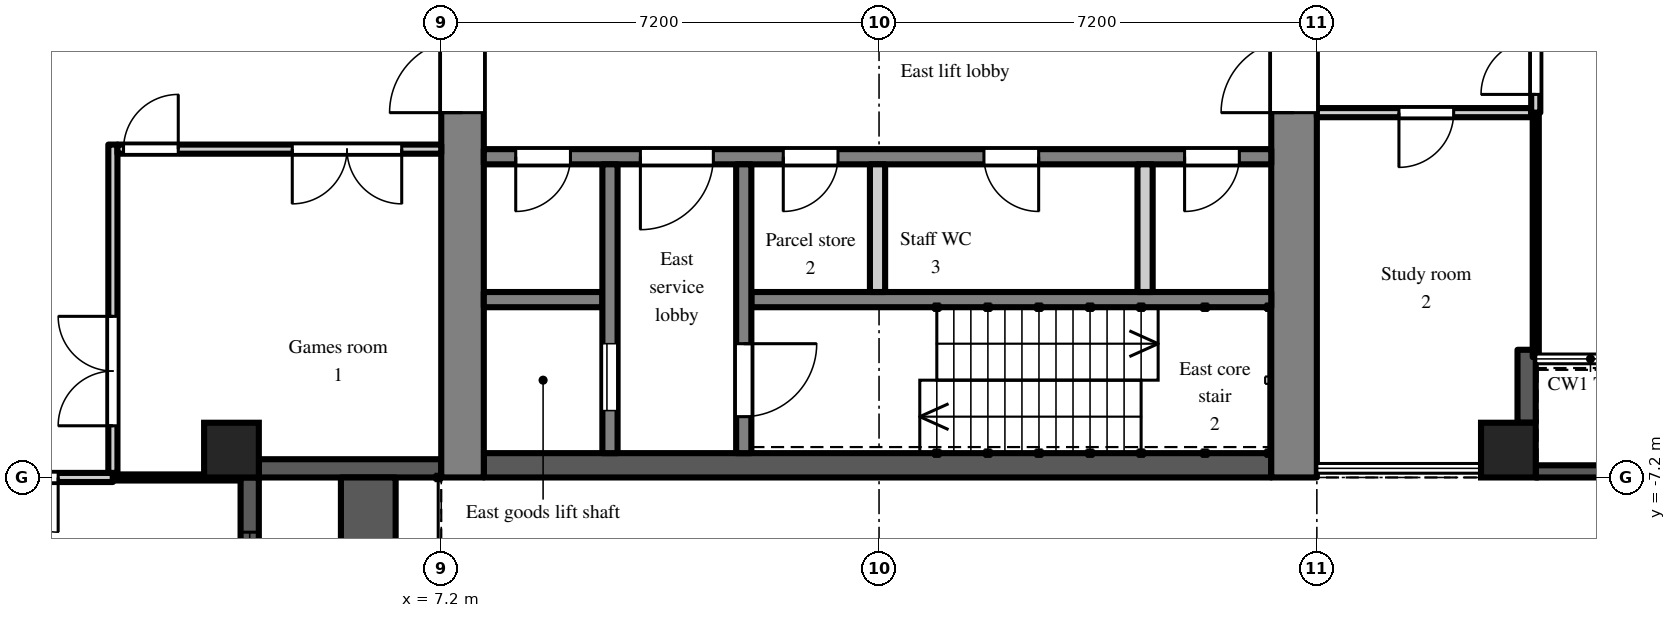
"""IFC4 building model, lengths in metres.
Left out: names, types, materials, properties, quantities, classifications, styles, units other than length and angle.
Written with IfcOpenShell. Run it as: python <this file> out.ifc"""

import sys

from ifc_helpers import new_model, si_unit, direction, frame, frame_2d, origin, origin_2d, place, context, subcontext, project, spatial, rectangle, extrude, element, fill, save


model = new_model("IFC4")
c1 = context("Model", 3, precision=1e-05, world=origin(), true_north=direction((0.0, 1.0)))
c2 = subcontext(c1, "Body", "Model", "MODEL_VIEW")
j1 = project(units=[si_unit("LENGTHUNIT", "METRE"), si_unit("PLANEANGLEUNIT", "RADIAN")], contexts=[c1])
p1 = place(None, origin())
s1 = spatial("IfcSite", under=j1, at=p1, CompositionType="ELEMENT")
p2 = place(p1, origin())
s2 = spatial("IfcBuilding", under=s1, at=p2, CompositionType="ELEMENT")
p3 = place(p2, frame((0.0, 0.0, 166.5)))
s3 = spatial("IfcBuildingStorey", under=s2, at=p3, CompositionType="ELEMENT", Elevation=166.5)
for number, where, z_axis, x_axis in (
    (1, (3.75, -6.75, 0.0), (0.0, 0.0, 1.0), (1.0, 0.0, 0.0)),
    (2, (24.75, -6.75, 0.0), (0.0, 0.0, 1.0), (1.0, 0.0, 0.0)),
):
    element("IfcColumn", number, at=place(p3, frame(where, z_axis=z_axis, x_axis=x_axis)), inside=s3, PredefinedType="COLUMN", context=c2, shape_type="SweptSolid", body=[
        extrude(rectangle(XDim=0.9, YDim=0.9, at=origin_2d()), origin(), (0.0, 0.0, 1.0), 4.2),
    ])
p4 = place(p3, frame((25.05, -6.3, 0.0), z_axis=(0.0, 0.0, 1.0), x_axis=(0.0, 1.0, 0.0)))
e3 = element("IfcWall", 3, at=p4, inside=s3, PredefinedType="SOLIDWALL", context=c2, shape_type="SweptSolid", body=[
    extrude(rectangle(XDim=1.2, YDim=0.3, at=frame_2d((0.6, 0.0))), origin(), (0.0, 0.0, 1.0), 3.8),
])
p5 = place(p3, frame((4.05, -14.4, 0.0), z_axis=(0.0, 0.0, 1.0), x_axis=(0.0, 1.0, 0.0)))
e4 = element("IfcWall", 4, at=p5, inside=s3, PredefinedType="SOLIDWALL", context=c2, shape_type="SweptSolid", body=[
    extrude(rectangle(XDim=7.2, YDim=0.3, at=frame_2d((3.6, 0.0))), origin(), (0.0, 0.0, 1.0), 3.4),
])
p6 = place(p5, frame((3.0, 0.0, 0.0)))
e5 = element("IfcOpeningElement", 5, at=p6, cuts=e4, PredefinedType="OPENING", context=c2, shape_type="SweptSolid", body=[
    extrude(rectangle(XDim=1.2, YDim=2.05, at=frame_2d((0.6, 1.025))), frame((0.0, 0.16, 0.0), z_axis=(0.0, -1.0, 0.0), x_axis=(1.0, 0.0, 0.0)), (0.0, 0.0, 1.0), 0.32),
])
p7 = place(p5, frame((0.9, 0.0, 0.2)))
e6 = element("IfcOpeningElement", 6, at=p7, cuts=e4, PredefinedType="OPENING", context=c2, shape_type="SweptSolid", body=[
    extrude(rectangle(XDim=1.8, YDim=1.85, at=frame_2d((0.9, 0.925))), frame((0.0, 0.16, 0.0), z_axis=(0.0, -1.0, 0.0), x_axis=(1.0, 0.0, 0.0)), (0.0, 0.0, 1.0), 0.32),
])
p8 = place(p5, frame((4.5, 0.0, 0.2)))
e7 = element("IfcOpeningElement", 7, at=p8, cuts=e4, PredefinedType="OPENING", context=c2, shape_type="SweptSolid", body=[
    extrude(rectangle(XDim=1.8, YDim=1.85, at=frame_2d((0.9, 0.925))), frame((0.0, 0.16, 0.0), z_axis=(0.0, -1.0, 0.0), x_axis=(1.0, 0.0, 0.0)), (0.0, 0.0, 1.0), 0.32),
])
p9 = place(p3, frame((4.2, -7.05, 0.0), z_axis=(0.0, 0.0, 1.0), x_axis=(1.0, 0.0, 0.0)))
e8 = element("IfcWall", 8, at=p9, inside=s3, PredefinedType="SOLIDWALL", context=c2, shape_type="SweptSolid", body=[
    extrude(rectangle(XDim=3.0, YDim=0.3, at=frame_2d((1.5, 0.0))), origin(), (0.0, 0.0, 1.0), 3.4),
])
p10 = place(p3, frame((6.0, -14.4, 0.0), z_axis=(0.0, 0.0, 1.0), x_axis=(0.0, 1.0, 0.0)))
e9 = element("IfcWall", 9, at=p10, inside=s3, PredefinedType="PARAPET", context=c2, shape_type="SweptSolid", body=[
    extrude(rectangle(XDim=7.2, YDim=0.9, at=frame_2d((3.6, 0.0))), origin(), (0.0, 0.0, 1.0), 0.8),
])
p11 = place(p3, frame((25.2, -7.1, 0.0), z_axis=(0.0, 0.0, 1.0), x_axis=(1.0, 0.0, 0.0)))
e10 = element("IfcWall", 10, at=p11, inside=s3, PredefinedType="PARAPET", context=c2, shape_type="SweptSolid", body=[
    extrude(rectangle(XDim=14.2, YDim=0.2, at=frame_2d((7.1, 0.0))), origin(), (0.0, 0.0, 1.0), 1.1),
])
p12 = place(p3, frame((7.55, -7.2, 0.0), z_axis=(0.0, 0.0, 1.0), x_axis=(0.0, 1.0, 0.0)))
e11 = element("IfcWall", 11, at=p12, inside=s3, PredefinedType="SHEAR", context=c2, shape_type="SweptSolid", body=[
    extrude(rectangle(XDim=14.4, YDim=0.7, at=frame_2d((7.2, 0.0))), origin(), (0.0, 0.0, 1.0), 3.8),
])
p13 = place(p12, frame((6.0, 0.0, 0.0)))
e12 = element("IfcOpeningElement", 12, at=p13, cuts=e11, PredefinedType="OPENING", context=c2, shape_type="SweptSolid", body=[
    extrude(rectangle(XDim=2.4, YDim=2.2, at=frame_2d((1.2, 1.1))), frame((0.0, 0.36, 0.0), z_axis=(0.0, -1.0, 0.0), x_axis=(1.0, 0.0, 0.0)), (0.0, 0.0, 1.0), 0.72),
])
p14 = place(p3, frame((21.225, -7.2, 0.0), z_axis=(0.0, 0.0, 1.0), x_axis=(0.0, 1.0, 0.0)))
e13 = element("IfcWall", 13, at=p14, inside=s3, PredefinedType="SHEAR", context=c2, shape_type="SweptSolid", body=[
    extrude(rectangle(XDim=14.4, YDim=0.75, at=frame_2d((7.2, 0.0))), origin(), (0.0, 0.0, 1.0), 3.8),
])
p15 = place(p14, frame((6.0, 0.0, 0.0)))
e14 = element("IfcOpeningElement", 14, at=p15, cuts=e13, PredefinedType="OPENING", context=c2, shape_type="SweptSolid", body=[
    extrude(rectangle(XDim=2.4, YDim=2.2, at=frame_2d((1.2, 1.1))), frame((0.0, 0.385, 0.0), z_axis=(0.0, -1.0, 0.0), x_axis=(1.0, 0.0, 0.0)), (0.0, 0.0, 1.0), 0.77),
])
p16 = place(p3, frame((7.9, -7.0, 0.0), z_axis=(0.0, 0.0, 1.0), x_axis=(1.0, 0.0, 0.0)))
e15 = element("IfcWall", 15, at=p16, inside=s3, PredefinedType="SHEAR", context=c2, shape_type="SweptSolid", body=[
    extrude(rectangle(XDim=12.95, YDim=0.4, at=frame_2d((6.475, 0.0))), origin(), (0.0, 0.0, 1.0), 3.8),
])
p17 = place(p3, frame((7.9, -1.925, 0.0), z_axis=(0.0, 0.0, 1.0), x_axis=(1.0, 0.0, 0.0)))
e16 = element("IfcWall", 16, at=p17, inside=s3, PredefinedType="SHEAR", context=c2, shape_type="SweptSolid", body=[
    extrude(rectangle(XDim=12.95, YDim=0.25, at=frame_2d((6.475, 0.0))), origin(), (0.0, 0.0, 1.0), 3.8),
])
p18 = place(p17, frame((0.525, 0.0, 0.0)))
e17 = element("IfcOpeningElement", 17, at=p18, cuts=e16, PredefinedType="OPENING", context=c2, shape_type="SweptSolid", body=[
    extrude(rectangle(XDim=0.9, YDim=2.1, at=frame_2d((0.45, 1.05))), frame((0.0, 0.135, 0.0), z_axis=(0.0, -1.0, 0.0), x_axis=(1.0, 0.0, 0.0)), (0.0, 0.0, 1.0), 0.27),
])
p19 = place(p17, frame((2.575, 0.0, 0.0)))
e18 = element("IfcOpeningElement", 18, at=p19, cuts=e16, PredefinedType="OPENING", context=c2, shape_type="SweptSolid", body=[
    extrude(rectangle(XDim=1.2, YDim=2.1, at=frame_2d((0.6, 1.05))), frame((0.0, 0.135, 0.0), z_axis=(0.0, -1.0, 0.0), x_axis=(1.0, 0.0, 0.0)), (0.0, 0.0, 1.0), 0.27),
])
p20 = place(p17, frame((4.925, 0.0, 0.0)))
e19 = element("IfcOpeningElement", 19, at=p20, cuts=e16, PredefinedType="OPENING", context=c2, shape_type="SweptSolid", body=[
    extrude(rectangle(XDim=0.9, YDim=2.1, at=frame_2d((0.45, 1.05))), frame((0.0, 0.135, 0.0), z_axis=(0.0, -1.0, 0.0), x_axis=(1.0, 0.0, 0.0)), (0.0, 0.0, 1.0), 0.27),
])
p21 = place(p17, frame((8.225, 0.0, 0.0)))
e20 = element("IfcOpeningElement", 20, at=p21, cuts=e16, PredefinedType="OPENING", context=c2, shape_type="SweptSolid", body=[
    extrude(rectangle(XDim=0.9, YDim=2.1, at=frame_2d((0.45, 1.05))), frame((0.0, 0.135, 0.0), z_axis=(0.0, -1.0, 0.0), x_axis=(1.0, 0.0, 0.0)), (0.0, 0.0, 1.0), 0.27),
])
p22 = place(p17, frame((11.525, 0.0, 0.0)))
e21 = element("IfcOpeningElement", 21, at=p22, cuts=e16, PredefinedType="OPENING", context=c2, shape_type="SweptSolid", body=[
    extrude(rectangle(XDim=0.9, YDim=2.1, at=frame_2d((0.45, 1.05))), frame((0.0, 0.135, 0.0), z_axis=(0.0, -1.0, 0.0), x_axis=(1.0, 0.0, 0.0)), (0.0, 0.0, 1.0), 0.27),
])
p23 = place(p3, frame((7.9, -4.275, 0.0), z_axis=(0.0, 0.0, 1.0), x_axis=(1.0, 0.0, 0.0)))
e22 = element("IfcWall", 22, at=p23, inside=s3, PredefinedType="SHEAR", context=c2, shape_type="SweptSolid", body=[
    extrude(rectangle(XDim=1.95, YDim=0.25, at=frame_2d((0.975, 0.0))), origin(), (0.0, 0.0, 1.0), 3.8),
])
p24 = place(p3, frame((12.3, -4.275, 0.0), z_axis=(0.0, 0.0, 1.0), x_axis=(1.0, 0.0, 0.0)))
e23 = element("IfcWall", 23, at=p24, inside=s3, PredefinedType="SHEAR", context=c2, shape_type="SweptSolid", body=[
    extrude(rectangle(XDim=8.55, YDim=0.25, at=frame_2d((4.275, 0.0))), origin(), (0.0, 0.0, 1.0), 3.8),
])
p25 = place(p3, frame((9.975, -2.05, 0.0), z_axis=(0.0, 0.0, 1.0), x_axis=(0.0, -1.0, 0.0)))
e24 = element("IfcWall", 24, at=p25, inside=s3, PredefinedType="SHEAR", context=c2, shape_type="SweptSolid", body=[
    extrude(rectangle(XDim=4.75, YDim=0.25, at=frame_2d((2.375, 0.0))), origin(), (0.0, 0.0, 1.0), 3.8),
])
p26 = place(p25, frame((2.95, 0.0, 0.0)))
e25 = element("IfcOpeningElement", 25, at=p26, cuts=e24, PredefinedType="OPENING", context=c2, shape_type="SweptSolid", body=[
    extrude(rectangle(XDim=1.1, YDim=2.1, at=frame_2d((0.55, 1.05))), frame((0.0, 0.135, 0.0), z_axis=(0.0, -1.0, 0.0), x_axis=(1.0, 0.0, 0.0)), (0.0, 0.0, 1.0), 0.27),
])
p27 = place(p3, frame((12.175, -2.05, 0.0), z_axis=(0.0, 0.0, 1.0), x_axis=(0.0, -1.0, 0.0)))
e26 = element("IfcWall", 26, at=p27, inside=s3, PredefinedType="SHEAR", context=c2, shape_type="SweptSolid", body=[
    extrude(rectangle(XDim=4.75, YDim=0.25, at=frame_2d((2.375, 0.0))), origin(), (0.0, 0.0, 1.0), 3.8),
])
p28 = place(p27, frame((2.95, 0.0, 0.0)))
e27 = element("IfcOpeningElement", 27, at=p28, cuts=e26, PredefinedType="OPENING", context=c2, shape_type="SweptSolid", body=[
    extrude(rectangle(XDim=1.2, YDim=2.1, at=frame_2d((0.6, 1.05))), frame((0.0, 0.135, 0.0), z_axis=(0.0, -1.0, 0.0), x_axis=(1.0, 0.0, 0.0)), (0.0, 0.0, 1.0), 0.27),
])
for number, where, z_axis, x_axis in (
    (28, (14.375, -2.05, 0.0), (0.0, 0.0, 1.0), (0.0, -1.0, 0.0)),
    (29, (18.775, -2.05, 0.0), (0.0, 0.0, 1.0), (0.0, -1.0, 0.0)),
):
    element("IfcWall", number, at=place(p3, frame(where, z_axis=z_axis, x_axis=x_axis)), inside=s3, PredefinedType="PARTITIONING", context=c2, shape_type="SweptSolid", body=[
        extrude(rectangle(XDim=2.1, YDim=0.25, at=frame_2d((1.05, 0.0))), origin(), (0.0, 0.0, 1.0), 3.8),
    ])
p29 = place(p3, frame((-3.765, -7.2, 0.0), z_axis=(0.0, 0.0, 1.0), x_axis=(1.0, 0.0, 0.0)))
e30 = element("IfcWall", 30, at=p29, inside=s3, PredefinedType="PARTITIONING", context=c2, shape_type="SweptSolid", body=[
    extrude(rectangle(XDim=5.565, YDim=0.15, at=frame_2d((2.782, 0.0))), origin(), (0.0, 0.0, 1.0), 3.8),
])
p30 = place(p29, frame((2.865, 0.0, 0.0)))
e31 = element("IfcOpeningElement", 31, at=p30, cuts=e30, PredefinedType="OPENING", context=c2, shape_type="SweptSolid", body=[
    extrude(rectangle(XDim=1.8, YDim=2.1, at=frame_2d((0.9, 1.05))), frame((0.0, 0.085, 0.0), z_axis=(0.0, -1.0, 0.0), x_axis=(1.0, 0.0, 0.0)), (0.0, 0.0, 1.0), 0.17),
])
p31 = place(p3, frame((1.8, -7.125, 0.0), z_axis=(0.0, 0.0, 1.0), x_axis=(0.0, 1.0, 0.0)))
e32 = element("IfcWall", 32, at=p31, inside=s3, PredefinedType="PARTITIONING", context=c2, shape_type="SweptSolid", body=[
    extrude(rectangle(XDim=5.4, YDim=0.15, at=frame_2d((2.7, 0.0))), origin(), (0.0, 0.0, 1.0), 3.8),
])
p32 = place(p31, frame((0.775, 0.0, 0.0)))
e33 = element("IfcOpeningElement", 33, at=p32, cuts=e32, PredefinedType="OPENING", context=c2, shape_type="SweptSolid", body=[
    extrude(rectangle(XDim=1.8, YDim=2.1, at=frame_2d((0.9, 1.05))), frame((0.0, 0.085, 0.0), z_axis=(0.0, -1.0, 0.0), x_axis=(1.0, 0.0, 0.0)), (0.0, 0.0, 1.0), 0.17),
])
p33 = place(p3, frame((1.8, -7.2, 0.0), z_axis=(0.0, 0.0, 1.0), x_axis=(1.0, 0.0, 0.0)))
e34 = element("IfcWall", 34, at=p33, inside=s3, PredefinedType="PARTITIONING", context=c2, shape_type="SweptSolid", body=[
    extrude(rectangle(XDim=2.1, YDim=0.1, at=frame_2d((1.05, 0.0))), origin(), (0.0, 0.0, 1.0), 3.8),
])
p34 = place(p3, frame((1.875, -1.8, 0.0), z_axis=(0.0, 0.0, 1.0), x_axis=(1.0, 0.0, 0.0)))
e35 = element("IfcWall", 35, at=p34, inside=s3, PredefinedType="PARTITIONING", context=c2, shape_type="SweptSolid", body=[
    extrude(rectangle(XDim=5.325, YDim=0.15, at=frame_2d((2.663, 0.0))), origin(), (0.0, 0.0, 1.0), 3.8),
])
p35 = place(p34, frame((0.1, 0.0, 0.0)))
e36 = element("IfcOpeningElement", 36, at=p35, cuts=e35, PredefinedType="OPENING", context=c2, shape_type="SweptSolid", body=[
    extrude(rectangle(XDim=0.9, YDim=2.1, at=frame_2d((0.45, 1.05))), frame((0.0, 0.085, 0.0), z_axis=(0.0, -1.0, 0.0), x_axis=(1.0, 0.0, 0.0)), (0.0, 0.0, 1.0), 0.17),
])
p36 = place(p34, frame((2.875, 0.0, 0.0)))
e37 = element("IfcOpeningElement", 37, at=p36, cuts=e35, PredefinedType="OPENING", context=c2, shape_type="SweptSolid", body=[
    extrude(rectangle(XDim=1.8, YDim=2.1, at=frame_2d((0.9, 1.05))), frame((0.0, 0.085, 0.0), z_axis=(0.0, -1.0, 0.0), x_axis=(1.0, 0.0, 0.0)), (0.0, 0.0, 1.0), 0.17),
])
p37 = place(p3, frame((21.6, -1.2, 0.0), z_axis=(0.0, 0.0, 1.0), x_axis=(1.0, 0.0, 0.0)))
e38 = element("IfcWall", 38, at=p37, inside=s3, PredefinedType="PARTITIONING", context=c2, shape_type="SweptSolid", body=[
    extrude(rectangle(XDim=3.525, YDim=0.15, at=frame_2d((1.762, 0.0))), origin(), (0.0, 0.0, 1.0), 3.8),
])
p38 = place(p37, frame((1.35, 0.0, 0.0)))
e39 = element("IfcOpeningElement", 39, at=p38, cuts=e38, PredefinedType="OPENING", context=c2, shape_type="SweptSolid", body=[
    extrude(rectangle(XDim=0.9, YDim=2.1, at=frame_2d((0.45, 1.05))), frame((0.0, 0.085, 0.0), z_axis=(0.0, -1.0, 0.0), x_axis=(1.0, 0.0, 0.0)), (0.0, 0.0, 1.0), 0.17),
])
p39 = place(p3, frame((25.2, -5.22, 0.0), z_axis=(0.0, 0.0, 1.0), x_axis=(0.0, 1.0, 0.0)))
e40 = element("IfcWall", 40, at=p39, inside=s3, PredefinedType="PARTITIONING", context=c2, shape_type="SweptSolid", body=[
    extrude(rectangle(XDim=4.02, YDim=0.1, at=frame_2d((2.01, 0.0))), origin(), (0.0, 0.0, 1.0), 3.8),
])
p40 = place(p3, frame((25.2, -1.2, 0.0), z_axis=(0.0, 0.0, 1.0), x_axis=(0.0, 1.0, 0.0)))
e41 = element("IfcWall", 41, at=p40, inside=s3, PredefinedType="PARTITIONING", context=c2, shape_type="SweptSolid", body=[
    extrude(rectangle(XDim=2.4, YDim=0.15, at=frame_2d((1.2, 0.0))), origin(), (0.0, 0.0, 1.0), 3.8),
])
p41 = place(p40, frame((0.3, 0.0, 0.0)))
e42 = element("IfcOpeningElement", 42, at=p41, cuts=e41, PredefinedType="OPENING", context=c2, shape_type="SweptSolid", body=[
    extrude(rectangle(XDim=1.8, YDim=2.1, at=frame_2d((0.9, 1.05))), frame((0.0, 0.085, 0.0), z_axis=(0.0, -1.0, 0.0), x_axis=(1.0, 0.0, 0.0)), (0.0, 0.0, 1.0), 0.17),
])
p42 = place(p8, origin())
e43 = element("IfcWindow", 43, at=p42, inside=s3, PartitioningType="SINGLE_PANEL", PredefinedType="WINDOW", context=c2, shape_type="SweptSolid", body=[
    extrude(rectangle(XDim=1.8, YDim=1.85, at=frame_2d((0.9, 0.925))), frame((0.0, 0.03, 0.0), z_axis=(0.0, -1.0, 0.0), x_axis=(1.0, 0.0, 0.0)), (0.0, 0.0, 1.0), 0.06),
])
fill(e7, e43)
p43 = place(p26, origin())
e44 = element("IfcDoor", 44, at=p43, inside=s3, OperationType="SLIDING_TO_LEFT", PredefinedType="DOOR", context=c2, shape_type="SweptSolid", body=[
    extrude(rectangle(XDim=1.1, YDim=2.1, at=frame_2d((0.55, 1.05))), frame((0.0, 0.025, 0.0), z_axis=(0.0, -1.0, 0.0), x_axis=(1.0, 0.0, 0.0)), (0.0, 0.0, 1.0), 0.05),
])
fill(e25, e44)
p44 = place(p28, origin())
e45 = element("IfcDoor", 45, at=p44, inside=s3, OperationType="SINGLE_SWING_LEFT", PredefinedType="DOOR", context=c2, shape_type="SweptSolid", body=[
    extrude(rectangle(XDim=1.2, YDim=2.1, at=frame_2d((0.6, 1.05))), frame((0.0, 0.025, 0.0), z_axis=(0.0, -1.0, 0.0), x_axis=(1.0, 0.0, 0.0)), (0.0, 0.0, 1.0), 0.05),
])
fill(e27, e45)
p45 = place(p18, frame((0.9, 0.0, 0.0), z_axis=(0.0, 0.0, 1.0), x_axis=(-1.0, 0.0, 0.0)))
e46 = element("IfcDoor", 46, at=p45, inside=s3, OperationType="SINGLE_SWING_RIGHT", PredefinedType="DOOR", context=c2, shape_type="SweptSolid", body=[
    extrude(rectangle(XDim=0.9, YDim=2.1, at=frame_2d((0.45, 1.05))), frame((0.0, 0.025, 0.0), z_axis=(0.0, -1.0, 0.0), x_axis=(1.0, 0.0, 0.0)), (0.0, 0.0, 1.0), 0.05),
])
fill(e17, e46)
p46 = place(p19, frame((1.2, 0.0, 0.0), z_axis=(0.0, 0.0, 1.0), x_axis=(-1.0, 0.0, 0.0)))
e47 = element("IfcDoor", 47, at=p46, inside=s3, OperationType="SINGLE_SWING_RIGHT", PredefinedType="DOOR", context=c2, shape_type="SweptSolid", body=[
    extrude(rectangle(XDim=1.2, YDim=2.1, at=frame_2d((0.6, 1.05))), frame((0.0, 0.025, 0.0), z_axis=(0.0, -1.0, 0.0), x_axis=(1.0, 0.0, 0.0)), (0.0, 0.0, 1.0), 0.05),
])
fill(e18, e47)
p47 = place(p13, origin())
e48 = element("IfcDoor", 48, at=p47, inside=s3, OperationType="DOUBLE_DOOR_DOUBLE_SWING", PredefinedType="DOOR", context=c2, shape_type="SweptSolid", body=[
    extrude(rectangle(XDim=2.4, YDim=2.2, at=frame_2d((1.2, 1.1))), frame((0.0, 0.025, 0.0), z_axis=(0.0, -1.0, 0.0), x_axis=(1.0, 0.0, 0.0)), (0.0, 0.0, 1.0), 0.05),
])
fill(e12, e48)
p48 = place(p15, origin())
e49 = element("IfcDoor", 49, at=p48, inside=s3, OperationType="DOUBLE_DOOR_DOUBLE_SWING", PredefinedType="DOOR", context=c2, shape_type="SweptSolid", body=[
    extrude(rectangle(XDim=2.4, YDim=2.2, at=frame_2d((1.2, 1.1))), frame((0.0, 0.025, 0.0), z_axis=(0.0, -1.0, 0.0), x_axis=(1.0, 0.0, 0.0)), (0.0, 0.0, 1.0), 0.05),
])
fill(e14, e49)
p49 = place(p20, frame((0.9, 0.0, 0.0), z_axis=(0.0, 0.0, 1.0), x_axis=(-1.0, 0.0, 0.0)))
e50 = element("IfcDoor", 50, at=p49, inside=s3, OperationType="SINGLE_SWING_RIGHT", PredefinedType="DOOR", context=c2, shape_type="SweptSolid", body=[
    extrude(rectangle(XDim=0.9, YDim=2.1, at=frame_2d((0.45, 1.05))), frame((0.0, 0.025, 0.0), z_axis=(0.0, -1.0, 0.0), x_axis=(1.0, 0.0, 0.0)), (0.0, 0.0, 1.0), 0.05),
])
fill(e19, e50)
p50 = place(p21, frame((0.9, 0.0, 0.0), z_axis=(0.0, 0.0, 1.0), x_axis=(-1.0, 0.0, 0.0)))
e51 = element("IfcDoor", 51, at=p50, inside=s3, OperationType="SINGLE_SWING_LEFT", PredefinedType="DOOR", context=c2, shape_type="SweptSolid", body=[
    extrude(rectangle(XDim=0.9, YDim=2.1, at=frame_2d((0.45, 1.05))), frame((0.0, 0.025, 0.0), z_axis=(0.0, -1.0, 0.0), x_axis=(1.0, 0.0, 0.0)), (0.0, 0.0, 1.0), 0.05),
])
fill(e20, e51)
p51 = place(p22, frame((0.9, 0.0, 0.0), z_axis=(0.0, 0.0, 1.0), x_axis=(-1.0, 0.0, 0.0)))
e52 = element("IfcDoor", 52, at=p51, inside=s3, OperationType="SINGLE_SWING_RIGHT", PredefinedType="DOOR", context=c2, shape_type="SweptSolid", body=[
    extrude(rectangle(XDim=0.9, YDim=2.1, at=frame_2d((0.45, 1.05))), frame((0.0, 0.025, 0.0), z_axis=(0.0, -1.0, 0.0), x_axis=(1.0, 0.0, 0.0)), (0.0, 0.0, 1.0), 0.05),
])
fill(e21, e52)
p52 = place(p32, origin())
e53 = element("IfcDoor", 53, at=p52, inside=s3, OperationType="DOUBLE_DOOR_DOUBLE_SWING", PredefinedType="DOOR", context=c2, shape_type="SweptSolid", body=[
    extrude(rectangle(XDim=1.8, YDim=2.1, at=frame_2d((0.9, 1.05))), frame((0.0, 0.025, 0.0), z_axis=(0.0, -1.0, 0.0), x_axis=(1.0, 0.0, 0.0)), (0.0, 0.0, 1.0), 0.05),
])
fill(e33, e53)
p53 = place(p35, origin())
e54 = element("IfcDoor", 54, at=p53, inside=s3, OperationType="SINGLE_SWING_RIGHT", PredefinedType="DOOR", context=c2, shape_type="SweptSolid", body=[
    extrude(rectangle(XDim=0.9, YDim=2.1, at=frame_2d((0.45, 1.05))), frame((0.0, 0.025, 0.0), z_axis=(0.0, -1.0, 0.0), x_axis=(1.0, 0.0, 0.0)), (0.0, 0.0, 1.0), 0.05),
])
fill(e36, e54)
p54 = place(p36, frame((1.8, 0.0, 0.0), z_axis=(0.0, 0.0, 1.0), x_axis=(-1.0, 0.0, 0.0)))
e55 = element("IfcDoor", 55, at=p54, inside=s3, OperationType="DOUBLE_DOOR_DOUBLE_SWING", PredefinedType="DOOR", context=c2, shape_type="SweptSolid", body=[
    extrude(rectangle(XDim=1.8, YDim=2.1, at=frame_2d((0.9, 1.05))), frame((0.0, 0.025, 0.0), z_axis=(0.0, -1.0, 0.0), x_axis=(1.0, 0.0, 0.0)), (0.0, 0.0, 1.0), 0.05),
])
fill(e37, e55)
p55 = place(p30, frame((1.8, 0.0, 0.0), z_axis=(0.0, 0.0, 1.0), x_axis=(-1.0, 0.0, 0.0)))
e56 = element("IfcDoor", 56, at=p55, inside=s3, OperationType="DOUBLE_DOOR_DOUBLE_SWING", PredefinedType="DOOR", context=c2, shape_type="SweptSolid", body=[
    extrude(rectangle(XDim=1.8, YDim=2.1, at=frame_2d((0.9, 1.05))), frame((0.0, 0.025, 0.0), z_axis=(0.0, -1.0, 0.0), x_axis=(1.0, 0.0, 0.0)), (0.0, 0.0, 1.0), 0.05),
])
fill(e31, e56)
p56 = place(p41, origin())
e57 = element("IfcDoor", 57, at=p56, inside=s3, OperationType="DOUBLE_DOOR_DOUBLE_SWING", PredefinedType="DOOR", context=c2, shape_type="SweptSolid", body=[
    extrude(rectangle(XDim=1.8, YDim=2.1, at=frame_2d((0.9, 1.05))), frame((0.0, 0.025, 0.0), z_axis=(0.0, -1.0, 0.0), x_axis=(1.0, 0.0, 0.0)), (0.0, 0.0, 1.0), 0.05),
])
fill(e42, e57)
p57 = place(p38, frame((0.9, 0.0, 0.0), z_axis=(0.0, 0.0, 1.0), x_axis=(-1.0, 0.0, 0.0)))
e58 = element("IfcDoor", 58, at=p57, inside=s3, OperationType="SINGLE_SWING_RIGHT", PredefinedType="DOOR", context=c2, shape_type="SweptSolid", body=[
    extrude(rectangle(XDim=0.9, YDim=2.1, at=frame_2d((0.45, 1.05))), frame((0.0, 0.025, 0.0), z_axis=(0.0, -1.0, 0.0), x_axis=(1.0, 0.0, 0.0)), (0.0, 0.0, 1.0), 0.05),
])
fill(e39, e58)
save(model, sys.argv[1])
